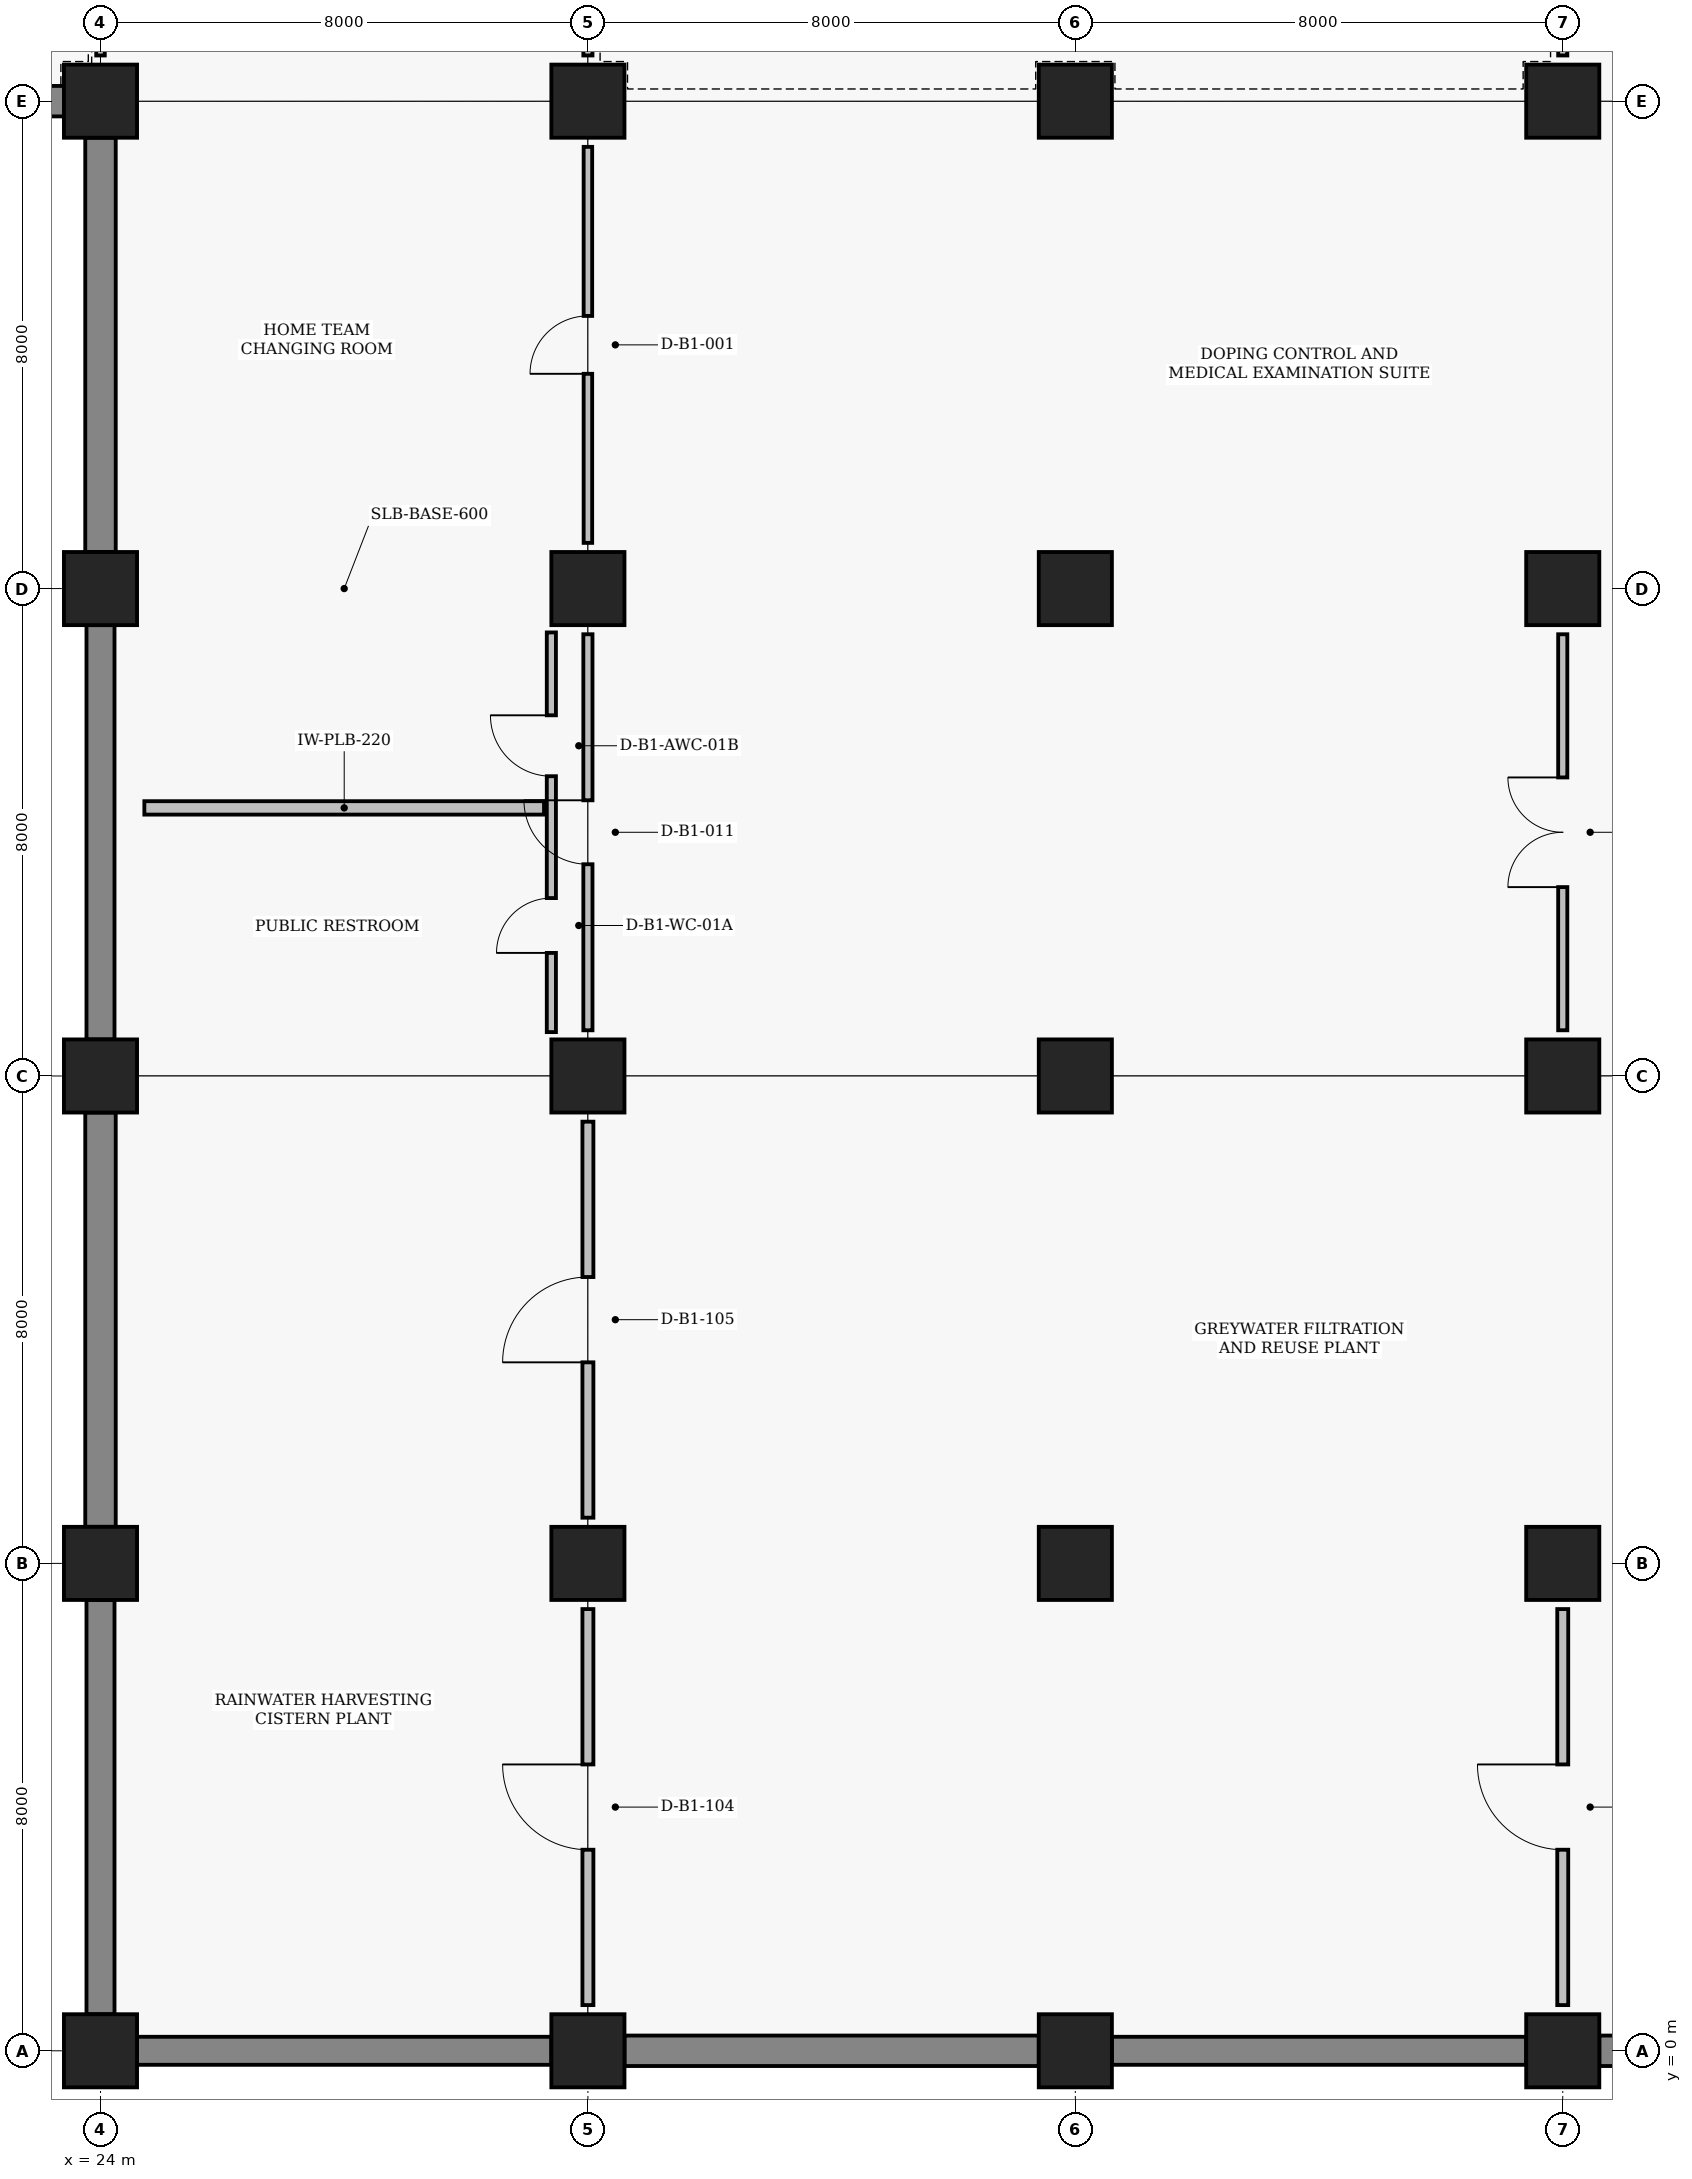
"""IFC4 building model, lengths in metres.
Left out: names, types, materials, properties, quantities, classifications, styles, units other than length and angle.
Written with IfcOpenShell. Run it as: python <this file> out.ifc"""

import sys

from ifc_helpers import new_model, si_unit, direction, frame, frame_2d, origin, origin_2d, place, context, subcontext, project, spatial, rectangle, extrude, element, fill, save


model = new_model("IFC4")
c1 = context("Model", 3, precision=1e-05, world=origin(), true_north=direction((0.0, 1.0)))
c2 = subcontext(c1, "Body", "Model", "MODEL_VIEW")
j1 = project(units=[si_unit("LENGTHUNIT", "METRE"), si_unit("PLANEANGLEUNIT", "RADIAN")], contexts=[c1])
p1 = place(None, origin())
s1 = spatial("IfcSite", under=j1, at=p1, CompositionType="ELEMENT")
p2 = place(p1, origin())
s2 = spatial("IfcBuilding", under=s1, at=p2, CompositionType="ELEMENT")
p3 = place(p2, frame((0.0, 0.0, -5.4)))
s3 = spatial("IfcBuildingStorey", under=s2, at=p3, CompositionType="ELEMENT", Elevation=-5.4)
for number, where, z_axis, x_axis in (
    (1, (24.0, 0.0, 0.0), (0.0, 0.0, 1.0), (1.0, 0.0, 0.0)),
    (2, (24.0, 8.0, 0.0), (0.0, 0.0, 1.0), (1.0, 0.0, 0.0)),
    (3, (24.0, 16.0, 0.0), (0.0, 0.0, 1.0), (1.0, 0.0, 0.0)),
    (4, (24.0, 24.0, 0.0), (0.0, 0.0, 1.0), (1.0, 0.0, 0.0)),
    (5, (24.0, 32.0, 0.0), (0.0, 0.0, 1.0), (1.0, 0.0, 0.0)),
    (6, (32.0, 0.0, 0.0), (0.0, 0.0, 1.0), (1.0, 0.0, 0.0)),
    (7, (32.0, 8.0, 0.0), (0.0, 0.0, 1.0), (1.0, 0.0, 0.0)),
    (8, (32.0, 16.0, 0.0), (0.0, 0.0, 1.0), (1.0, 0.0, 0.0)),
    (9, (32.0, 24.0, 0.0), (0.0, 0.0, 1.0), (1.0, 0.0, 0.0)),
    (10, (32.0, 32.0, 0.0), (0.0, 0.0, 1.0), (1.0, 0.0, 0.0)),
    (11, (40.0, 0.0, 0.0), (0.0, 0.0, 1.0), (1.0, 0.0, 0.0)),
    (12, (40.0, 8.0, 0.0), (0.0, 0.0, 1.0), (1.0, 0.0, 0.0)),
    (13, (40.0, 16.0, 0.0), (0.0, 0.0, 1.0), (1.0, 0.0, 0.0)),
    (14, (40.0, 24.0, 0.0), (0.0, 0.0, 1.0), (1.0, 0.0, 0.0)),
    (15, (40.0, 32.0, 0.0), (0.0, 0.0, 1.0), (1.0, 0.0, 0.0)),
    (16, (48.0, 0.0, 0.0), (0.0, 0.0, 1.0), (1.0, 0.0, 0.0)),
    (17, (48.0, 8.0, 0.0), (0.0, 0.0, 1.0), (1.0, 0.0, 0.0)),
    (18, (48.0, 16.0, 0.0), (0.0, 0.0, 1.0), (1.0, 0.0, 0.0)),
    (19, (48.0, 24.0, 0.0), (0.0, 0.0, 1.0), (1.0, 0.0, 0.0)),
    (20, (48.0, 32.0, 0.0), (0.0, 0.0, 1.0), (1.0, 0.0, 0.0)),
):
    element("IfcColumn", number, at=place(p3, frame(where, z_axis=z_axis, x_axis=x_axis)), inside=s3, PredefinedType="COLUMN", context=c2, shape_type="SweptSolid", body=[
        extrude(rectangle(XDim=1.2, YDim=1.2, at=origin_2d()), origin(), (0.0, 0.0, 1.0), 5.4),
    ])
p4 = place(p3, frame((16.5, 32.0, 0.0), z_axis=(0.0, 0.0, 1.0), x_axis=(1.0, 0.0, 0.0)))
e21 = element("IfcWall", 21, at=p4, inside=s3, PredefinedType="STANDARD", context=c2, shape_type="SweptSolid", body=[
    extrude(rectangle(XDim=6.9, YDim=0.5, at=frame_2d((3.45, 0.0))), origin(), (0.0, 0.0, 1.0), 3.69),
])
for number, where, z_axis, x_axis in (
    (22, (24.6, 0.0, 0.0), (0.0, 0.0, 1.0), (1.0, 0.0, 0.0)),
    (23, (24.0, 0.6, 0.0), (0.0, 0.0, 1.0), (0.0, 1.0, 0.0)),
):
    element("IfcWall", number, at=place(p3, frame(where, z_axis=z_axis, x_axis=x_axis)), inside=s3, PredefinedType="STANDARD", context=c2, shape_type="SweptSolid", body=[
        extrude(rectangle(XDim=6.8, YDim=0.46, at=frame_2d((3.4, 0.0))), origin(), (0.0, 0.0, 1.0), 4.19),
    ])
p5 = place(p3, frame((24.0, 8.6, 0.0), z_axis=(0.0, 0.0, 1.0), x_axis=(0.0, 1.0, 0.0)))
e24 = element("IfcWall", 24, at=p5, inside=s3, PredefinedType="STANDARD", context=c2, shape_type="SweptSolid", body=[
    extrude(rectangle(XDim=6.8, YDim=0.5, at=frame_2d((3.4, 0.0))), origin(), (0.0, 0.0, 1.0), 4.19),
])
p6 = place(p3, frame((24.0, 16.6, 0.0), z_axis=(0.0, 0.0, 1.0), x_axis=(0.0, 1.0, 0.0)))
e25 = element("IfcWall", 25, at=p6, inside=s3, PredefinedType="STANDARD", context=c2, shape_type="SweptSolid", body=[
    extrude(rectangle(XDim=6.8, YDim=0.46, at=frame_2d((3.4, 0.0))), origin(), (0.0, 0.0, 1.0), 4.19),
])
p7 = place(p3, frame((24.0, 24.6, 0.0), z_axis=(0.0, 0.0, 1.0), x_axis=(0.0, 1.0, 0.0)))
e26 = element("IfcWall", 26, at=p7, inside=s3, PredefinedType="STANDARD", context=c2, shape_type="SweptSolid", body=[
    extrude(rectangle(XDim=6.8, YDim=0.5, at=frame_2d((3.4, 0.0))), origin(), (0.0, 0.0, 1.0), 3.69),
])
p8 = place(p3, frame((32.6, 0.0, 0.0), z_axis=(0.0, 0.0, 1.0), x_axis=(1.0, 0.0, 0.0)))
e27 = element("IfcWall", 27, at=p8, inside=s3, PredefinedType="STANDARD", context=c2, shape_type="SweptSolid", body=[
    extrude(rectangle(XDim=6.8, YDim=0.5, at=frame_2d((3.4, 0.0))), origin(), (0.0, 0.0, 1.0), 4.29),
])
p9 = place(p3, frame((40.6, 0.0, 0.0), z_axis=(0.0, 0.0, 1.0), x_axis=(1.0, 0.0, 0.0)))
e28 = element("IfcWall", 28, at=p9, inside=s3, PredefinedType="STANDARD", context=c2, shape_type="SweptSolid", body=[
    extrude(rectangle(XDim=6.8, YDim=0.46, at=frame_2d((3.4, 0.0))), origin(), (0.0, 0.0, 1.0), 4.29),
])
p10 = place(p3, frame((48.6, 0.0, 0.0), z_axis=(0.0, 0.0, 1.0), x_axis=(1.0, 0.0, 0.0)))
e29 = element("IfcWall", 29, at=p10, inside=s3, PredefinedType="STANDARD", context=c2, shape_type="SweptSolid", body=[
    extrude(rectangle(XDim=6.8, YDim=0.5, at=frame_2d((3.4, 0.0))), origin(), (0.0, 0.0, 1.0), 4.29),
])
p11 = place(p3, frame((24.72, 20.4, 0.0), z_axis=(0.0, 0.0, 1.0), x_axis=(1.0, 0.0, 0.0)))
e30 = element("IfcWall", 30, at=p11, inside=s3, PredefinedType="PLUMBINGWALL", context=c2, shape_type="SweptSolid", body=[
    extrude(rectangle(XDim=6.56, YDim=0.22, at=frame_2d((3.28, 0.0))), origin(), (0.0, 0.0, 1.0), 4.69),
])
p12 = place(p3, frame((31.4, 16.72, 0.0), z_axis=(0.0, 0.0, 1.0), x_axis=(0.0, 1.0, 0.0)))
e31 = element("IfcWall", 31, at=p12, inside=s3, PredefinedType="PARTITIONING", context=c2, shape_type="SweptSolid", body=[
    extrude(rectangle(XDim=6.56, YDim=0.15, at=frame_2d((3.28, 0.0))), origin(), (0.0, 0.0, 1.0), 3.69),
])
p13 = place(p12, frame((1.3, 0.0, 0.0)))
e32 = element("IfcOpeningElement", 32, at=p13, cuts=e31, PredefinedType="OPENING", context=c2, shape_type="SweptSolid", body=[
    extrude(rectangle(XDim=0.9, YDim=2.1, at=frame_2d((0.45, 1.05))), frame((0.0, 0.085, 0.0), z_axis=(0.0, -1.0, 0.0), x_axis=(1.0, 0.0, 0.0)), (0.0, 0.0, 1.0), 0.17),
])
p14 = place(p12, frame((4.2, 0.0, 0.0)))
e33 = element("IfcOpeningElement", 33, at=p14, cuts=e31, PredefinedType="OPENING", context=c2, shape_type="SweptSolid", body=[
    extrude(rectangle(XDim=1.0, YDim=2.15, at=frame_2d((0.5, 1.075))), frame((0.0, 0.085, 0.0), z_axis=(0.0, -1.0, 0.0), x_axis=(1.0, 0.0, 0.0)), (0.0, 0.0, 1.0), 0.17),
])
p15 = place(p3, frame((32.0, 24.75, 0.0), z_axis=(0.0, 0.0, 1.0), x_axis=(0.0, 1.0, 0.0)))
e34 = element("IfcWall", 34, at=p15, inside=s3, PredefinedType="MOVABLE", context=c2, shape_type="SweptSolid", body=[
    extrude(rectangle(XDim=6.5, YDim=0.14, at=frame_2d((3.25, 0.0))), origin(), (0.0, 0.0, 1.0), 3.69),
])
p16 = place(p15, frame((2.775, 0.0, 0.0)))
e35 = element("IfcOpeningElement", 35, at=p16, cuts=e34, PredefinedType="OPENING", context=c2, shape_type="SweptSolid", body=[
    extrude(rectangle(XDim=0.95, YDim=2.1, at=frame_2d((0.475, 1.05))), frame((0.0, 0.08, 0.0), z_axis=(0.0, -1.0, 0.0), x_axis=(1.0, 0.0, 0.0)), (0.0, 0.0, 1.0), 0.16),
])
p17 = place(p3, frame((24.0, 32.75, 0.0), z_axis=(0.0, 0.0, 1.0), x_axis=(0.0, 1.0, 0.0)))
e36 = element("IfcWall", 36, at=p17, inside=s3, PredefinedType="MOVABLE", context=c2, shape_type="SweptSolid", body=[
    extrude(rectangle(XDim=6.5, YDim=0.14, at=frame_2d((3.25, 0.0))), origin(), (0.0, 0.0, 1.0), 3.69),
])
p18 = place(p17, frame((2.75, 0.0, 0.0)))
e37 = element("IfcOpeningElement", 37, at=p18, cuts=e36, PredefinedType="OPENING", context=c2, shape_type="SweptSolid", body=[
    extrude(rectangle(XDim=1.0, YDim=2.1, at=frame_2d((0.5, 1.05))), frame((0.0, 0.08, 0.0), z_axis=(0.0, -1.0, 0.0), x_axis=(1.0, 0.0, 0.0)), (0.0, 0.0, 1.0), 0.16),
])
p19 = place(p3, frame((32.0, 16.75, 0.0), z_axis=(0.0, 0.0, 1.0), x_axis=(0.0, 1.0, 0.0)))
e38 = element("IfcWall", 38, at=p19, inside=s3, PredefinedType="PARTITIONING", context=c2, shape_type="SweptSolid", body=[
    extrude(rectangle(XDim=6.5, YDim=0.15, at=frame_2d((3.25, 0.0))), origin(), (0.0, 0.0, 1.0), 3.69),
])
p20 = place(p19, frame((2.725, 0.0, 0.0)))
e39 = element("IfcOpeningElement", 39, at=p20, cuts=e38, PredefinedType="OPENING", context=c2, shape_type="SweptSolid", body=[
    extrude(rectangle(XDim=1.05, YDim=2.15, at=frame_2d((0.525, 1.075))), frame((0.0, 0.085, 0.0), z_axis=(0.0, -1.0, 0.0), x_axis=(1.0, 0.0, 0.0)), (0.0, 0.0, 1.0), 0.17),
])
p21 = place(p3, frame((32.0, 32.75, 0.0), z_axis=(0.0, 0.0, 1.0), x_axis=(0.0, 1.0, 0.0)))
e40 = element("IfcWall", 40, at=p21, inside=s3, PredefinedType="PARTITIONING", context=c2, shape_type="SweptSolid", body=[
    extrude(rectangle(XDim=6.5, YDim=0.15, at=frame_2d((3.25, 0.0))), origin(), (0.0, 0.0, 1.0), 3.69),
])
p22 = place(p21, frame((2.35, 0.0, 0.0)))
e41 = element("IfcOpeningElement", 41, at=p22, cuts=e40, PredefinedType="OPENING", context=c2, shape_type="SweptSolid", body=[
    extrude(rectangle(XDim=1.8, YDim=2.3, at=frame_2d((0.9, 1.15))), frame((0.0, 0.085, 0.0), z_axis=(0.0, -1.0, 0.0), x_axis=(1.0, 0.0, 0.0)), (0.0, 0.0, 1.0), 0.17),
])
p23 = place(p3, frame((48.0, 16.75, 0.0), z_axis=(0.0, 0.0, 1.0), x_axis=(0.0, 1.0, 0.0)))
e42 = element("IfcWall", 42, at=p23, inside=s3, PredefinedType="PARTITIONING", context=c2, shape_type="SweptSolid", body=[
    extrude(rectangle(XDim=6.5, YDim=0.15, at=frame_2d((3.25, 0.0))), origin(), (0.0, 0.0, 1.0), 3.64),
])
p24 = place(p23, frame((2.35, 0.0, 0.0)))
e43 = element("IfcOpeningElement", 43, at=p24, cuts=e42, PredefinedType="OPENING", context=c2, shape_type="SweptSolid", body=[
    extrude(rectangle(XDim=1.8, YDim=2.3, at=frame_2d((0.9, 1.15))), frame((0.0, 0.085, 0.0), z_axis=(0.0, -1.0, 0.0), x_axis=(1.0, 0.0, 0.0)), (0.0, 0.0, 1.0), 0.17),
])
p25 = place(p3, frame((48.0, 32.75, 0.0), z_axis=(0.0, 0.0, 1.0), x_axis=(0.0, 1.0, 0.0)))
e44 = element("IfcWall", 44, at=p25, inside=s3, PredefinedType="PARTITIONING", context=c2, shape_type="SweptSolid", body=[
    extrude(rectangle(XDim=6.5, YDim=0.15, at=frame_2d((3.25, 0.0))), origin(), (0.0, 0.0, 1.0), 4.39),
])
p26 = place(p25, frame((2.725, 0.0, 0.0)))
e45 = element("IfcOpeningElement", 45, at=p26, cuts=e44, PredefinedType="OPENING", context=c2, shape_type="SweptSolid", body=[
    extrude(rectangle(XDim=1.05, YDim=2.15, at=frame_2d((0.525, 1.075))), frame((0.0, 0.085, 0.0), z_axis=(0.0, -1.0, 0.0), x_axis=(1.0, 0.0, 0.0)), (0.0, 0.0, 1.0), 0.17),
])
p27 = place(p3, frame((32.0, 0.75, 0.0), z_axis=(0.0, 0.0, 1.0), x_axis=(0.0, 1.0, 0.0)))
e46 = element("IfcWall", 46, at=p27, inside=s3, PredefinedType="PARTITIONING", context=c2, shape_type="SweptSolid", body=[
    extrude(rectangle(XDim=6.5, YDim=0.18, at=frame_2d((3.25, 0.0))), origin(), (0.0, 0.0, 1.0), 4.34),
])
p28 = place(p27, frame((2.55, 0.0, 0.0)))
e47 = element("IfcOpeningElement", 47, at=p28, cuts=e46, PredefinedType="OPENING", context=c2, shape_type="SweptSolid", body=[
    extrude(rectangle(XDim=1.4, YDim=2.2, at=frame_2d((0.7, 1.1))), frame((0.0, 0.1, 0.0), z_axis=(0.0, -1.0, 0.0), x_axis=(1.0, 0.0, 0.0)), (0.0, 0.0, 1.0), 0.2),
])
p29 = place(p3, frame((32.0, 8.75, 0.0), z_axis=(0.0, 0.0, 1.0), x_axis=(0.0, 1.0, 0.0)))
e48 = element("IfcWall", 48, at=p29, inside=s3, PredefinedType="PARTITIONING", context=c2, shape_type="SweptSolid", body=[
    extrude(rectangle(XDim=6.5, YDim=0.18, at=frame_2d((3.25, 0.0))), origin(), (0.0, 0.0, 1.0), 4.34),
])
p30 = place(p29, frame((2.55, 0.0, 0.0)))
e49 = element("IfcOpeningElement", 49, at=p30, cuts=e48, PredefinedType="OPENING", context=c2, shape_type="SweptSolid", body=[
    extrude(rectangle(XDim=1.4, YDim=2.2, at=frame_2d((0.7, 1.1))), frame((0.0, 0.1, 0.0), z_axis=(0.0, -1.0, 0.0), x_axis=(1.0, 0.0, 0.0)), (0.0, 0.0, 1.0), 0.2),
])
p31 = place(p3, frame((48.0, 0.75, 0.0), z_axis=(0.0, 0.0, 1.0), x_axis=(0.0, 1.0, 0.0)))
e50 = element("IfcWall", 50, at=p31, inside=s3, PredefinedType="PARTITIONING", context=c2, shape_type="SweptSolid", body=[
    extrude(rectangle(XDim=6.5, YDim=0.18, at=frame_2d((3.25, 0.0))), origin(), (0.0, 0.0, 1.0), 3.64),
])
p32 = place(p31, frame((2.55, 0.0, 0.0)))
e51 = element("IfcOpeningElement", 51, at=p32, cuts=e50, PredefinedType="OPENING", context=c2, shape_type="SweptSolid", body=[
    extrude(rectangle(XDim=1.4, YDim=2.2, at=frame_2d((0.7, 1.1))), frame((0.0, 0.1, 0.0), z_axis=(0.0, -1.0, 0.0), x_axis=(1.0, 0.0, 0.0)), (0.0, 0.0, 1.0), 0.2),
])
p33 = place(p13, origin())
e52 = element("IfcDoor", 52, at=p33, inside=s3, OperationType="SINGLE_SWING_LEFT", PredefinedType="DOOR", context=c2, shape_type="SweptSolid", body=[
    extrude(rectangle(XDim=0.9, YDim=2.1, at=frame_2d((0.45, 1.05))), frame((0.0, 0.025, 0.0), z_axis=(0.0, -1.0, 0.0), x_axis=(1.0, 0.0, 0.0)), (0.0, 0.0, 1.0), 0.05),
])
fill(e32, e52)
p34 = place(p14, origin())
e53 = element("IfcDoor", 53, at=p34, inside=s3, OperationType="SINGLE_SWING_RIGHT", PredefinedType="DOOR", context=c2, shape_type="SweptSolid", body=[
    extrude(rectangle(XDim=1.0, YDim=2.15, at=frame_2d((0.5, 1.075))), frame((0.0, 0.025, 0.0), z_axis=(0.0, -1.0, 0.0), x_axis=(1.0, 0.0, 0.0)), (0.0, 0.0, 1.0), 0.05),
])
fill(e33, e53)
p35 = place(p16, origin())
e54 = element("IfcDoor", 54, at=p35, inside=s3, OperationType="SINGLE_SWING_LEFT", PredefinedType="DOOR", context=c2, shape_type="SweptSolid", body=[
    extrude(rectangle(XDim=0.95, YDim=2.1, at=frame_2d((0.475, 1.05))), frame((0.0, 0.025, 0.0), z_axis=(0.0, -1.0, 0.0), x_axis=(1.0, 0.0, 0.0)), (0.0, 0.0, 1.0), 0.05),
])
fill(e35, e54)
p36 = place(p20, origin())
e55 = element("IfcDoor", 55, at=p36, inside=s3, OperationType="SINGLE_SWING_RIGHT", PredefinedType="DOOR", context=c2, shape_type="SweptSolid", body=[
    extrude(rectangle(XDim=1.05, YDim=2.15, at=frame_2d((0.525, 1.075))), frame((0.0, 0.025, 0.0), z_axis=(0.0, -1.0, 0.0), x_axis=(1.0, 0.0, 0.0)), (0.0, 0.0, 1.0), 0.05),
])
fill(e39, e55)
p37 = place(p24, origin())
e56 = element("IfcDoor", 56, at=p37, inside=s3, OperationType="DOUBLE_SWING_LEFT", PredefinedType="DOOR", context=c2, shape_type="SweptSolid", body=[
    extrude(rectangle(XDim=1.8, YDim=2.3, at=frame_2d((0.9, 1.15))), frame((0.0, 0.025, 0.0), z_axis=(0.0, -1.0, 0.0), x_axis=(1.0, 0.0, 0.0)), (0.0, 0.0, 1.0), 0.05),
])
fill(e43, e56)
p38 = place(p28, origin())
e57 = element("IfcDoor", 57, at=p38, inside=s3, OperationType="SINGLE_SWING_RIGHT", PredefinedType="DOOR", context=c2, shape_type="SweptSolid", body=[
    extrude(rectangle(XDim=1.4, YDim=2.2, at=frame_2d((0.7, 1.1))), frame((0.0, 0.025, 0.0), z_axis=(0.0, -1.0, 0.0), x_axis=(1.0, 0.0, 0.0)), (0.0, 0.0, 1.0), 0.05),
])
fill(e47, e57)
p39 = place(p30, origin())
e58 = element("IfcDoor", 58, at=p39, inside=s3, OperationType="SINGLE_SWING_LEFT", PredefinedType="DOOR", context=c2, shape_type="SweptSolid", body=[
    extrude(rectangle(XDim=1.4, YDim=2.2, at=frame_2d((0.7, 1.1))), frame((0.0, 0.025, 0.0), z_axis=(0.0, -1.0, 0.0), x_axis=(1.0, 0.0, 0.0)), (0.0, 0.0, 1.0), 0.05),
])
fill(e49, e58)
p40 = place(p32, origin())
e59 = element("IfcDoor", 59, at=p40, inside=s3, OperationType="SINGLE_SWING_RIGHT", PredefinedType="DOOR", context=c2, shape_type="SweptSolid", body=[
    extrude(rectangle(XDim=1.4, YDim=2.2, at=frame_2d((0.7, 1.1))), frame((0.0, 0.025, 0.0), z_axis=(0.0, -1.0, 0.0), x_axis=(1.0, 0.0, 0.0)), (0.0, 0.0, 1.0), 0.05),
])
fill(e51, e59)
save(model, sys.argv[1])
